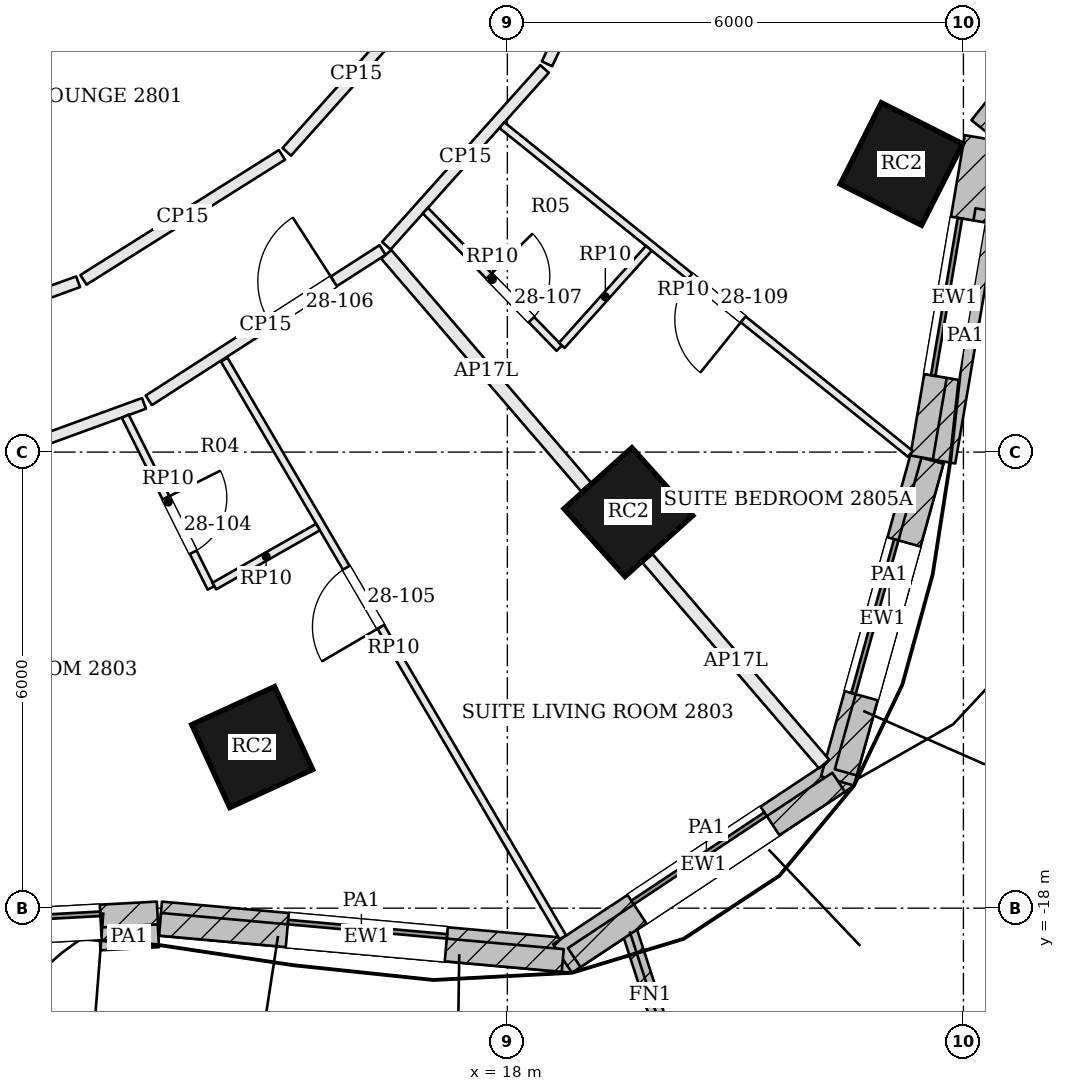
"""IFC4 building model, lengths in metres.
Left out: names, types, materials, properties, quantities, classifications, styles, units other than length and angle.
Written with IfcOpenShell. Run it as: python <this file> out.ifc"""

import sys

from ifc_helpers import new_model, si_unit, direction, frame, frame_2d, origin, origin_2d, place, context, subcontext, project, spatial, rectangle, extrude, element, fill, save


model = new_model("IFC4")
c1 = context("Model", 3, precision=1e-05, world=origin(), true_north=direction((0.0, 1.0)))
c2 = subcontext(c1, "Body", "Model", "MODEL_VIEW")
j1 = project(units=[si_unit("LENGTHUNIT", "METRE"), si_unit("PLANEANGLEUNIT", "RADIAN")], contexts=[c1])
p1 = place(None, origin())
s1 = spatial("IfcSite", under=j1, at=p1, CompositionType="ELEMENT")
p2 = place(p1, origin())
s2 = spatial("IfcBuilding", under=s1, at=p2, CompositionType="ELEMENT")
p3 = place(p2, frame((0.0, 0.0, 117.6)))
s3 = spatial("IfcBuildingStorey", under=s2, at=p3, CompositionType="ELEMENT", Elevation=117.6)
for number, where, z_axis, x_axis in (
    (1, (14.643, -15.881, 0.0), (0.0, 0.0, 1.0), (0.909, 0.417, 0.0)),
    (2, (19.593, -12.79, 0.0), (0.0, 0.0, 1.0), (0.744, 0.668, 0.0)),
    (3, (23.185, -8.21, 0.0), (0.0, 0.0, 1.0), (0.451, 0.893, 0.0)),
):
    element("IfcColumn", number, at=place(p3, frame(where, z_axis=z_axis, x_axis=x_axis)), inside=s3, PredefinedType="COLUMN", context=c2, shape_type="SweptSolid", body=[
        extrude(rectangle(XDim=1.2, YDim=1.2, at=origin_2d()), origin(), (0.0, 0.0, 1.0), 2.8),
    ])
p4 = place(p3, frame((9.803, -18.334, 0.0), z_axis=(0.0, 0.0, 1.0), x_axis=(0.998525941495, 0.054276552602, 0.0)))
e4 = element("IfcWall", 4, at=p4, inside=s3, PredefinedType="SOLIDWALL", context=c2, shape_type="SweptSolid", body=[
    extrude(rectangle(XDim=3.603, YDim=0.45, at=frame_2d((1.802, 0.0))), origin(), (0.0, 0.0, 1.0), 3.3),
])
p5 = place(p4, frame((0.751, 0.0, 0.9)))
e5 = element("IfcOpeningElement", 5, at=p5, cuts=e4, PredefinedType="OPENING", context=c2, shape_type="SweptSolid", body=[
    extrude(rectangle(XDim=2.1, YDim=1.8, at=frame_2d((1.05, 0.9))), frame((0.0, 0.235, 0.0), z_axis=(0.0, -1.0, 0.0), x_axis=(1.0, 0.0, 0.0)), (0.0, 0.0, 1.0), 0.47),
])
p6 = place(p3, frame((13.436, -18.138, 0.0), z_axis=(0.0, 0.0, 1.0), x_axis=(0.99598810213, -0.089485755376, 0.0)))
e6 = element("IfcWall", 6, at=p6, inside=s3, PredefinedType="SOLIDWALL", context=c2, shape_type="SweptSolid", body=[
    extrude(rectangle(XDim=5.451, YDim=0.45, at=frame_2d((2.726, 0.0))), origin(), (0.0, 0.0, 1.0), 3.3),
])
p7 = place(p6, frame((1.676, 0.0, 0.9)))
e7 = element("IfcOpeningElement", 7, at=p7, cuts=e6, PredefinedType="OPENING", context=c2, shape_type="SweptSolid", body=[
    extrude(rectangle(XDim=2.1, YDim=1.8, at=frame_2d((1.05, 0.9))), frame((0.0, 0.235, 0.0), z_axis=(0.0, -1.0, 0.0), x_axis=(1.0, 0.0, 0.0)), (0.0, 0.0, 1.0), 0.47),
])
p8 = place(p3, frame((18.726, -18.663, 0.0), z_axis=(0.0, 0.0, 1.0), x_axis=(0.83333921474, 0.552761931736, 0.0)))
e8 = element("IfcWall", 8, at=p8, inside=s3, PredefinedType="SOLIDWALL", context=c2, shape_type="SweptSolid", body=[
    extrude(rectangle(XDim=4.451, YDim=0.45, at=frame_2d((2.225, 0.0))), origin(), (0.0, 0.0, 1.0), 3.3),
])
p9 = place(p8, frame((1.175, 0.0, 0.9)))
e9 = element("IfcOpeningElement", 9, at=p9, cuts=e8, PredefinedType="OPENING", context=c2, shape_type="SweptSolid", body=[
    extrude(rectangle(XDim=2.1, YDim=1.8, at=frame_2d((1.05, 0.9))), frame((0.0, 0.235, 0.0), z_axis=(0.0, -1.0, 0.0), x_axis=(1.0, 0.0, 0.0)), (0.0, 0.0, 1.0), 0.47),
])
p10 = place(p3, frame((22.344, -16.326, 0.0), z_axis=(0.0, 0.0, 1.0), x_axis=(0.267925456304, 0.963439645159, 0.0)))
e10 = element("IfcWall", 10, at=p10, inside=s3, PredefinedType="SOLIDWALL", context=c2, shape_type="SweptSolid", body=[
    extrude(rectangle(XDim=4.427, YDim=0.45, at=frame_2d((2.213, 0.0))), origin(), (0.0, 0.0, 1.0), 3.3),
])
p11 = place(p10, frame((1.164, 0.0, 0.9)))
e11 = element("IfcOpeningElement", 11, at=p11, cuts=e10, PredefinedType="OPENING", context=c2, shape_type="SweptSolid", body=[
    extrude(rectangle(XDim=2.1, YDim=1.8, at=frame_2d((1.05, 0.9))), frame((0.0, 0.235, 0.0), z_axis=(0.0, -1.0, 0.0), x_axis=(1.0, 0.0, 0.0)), (0.0, 0.0, 1.0), 0.47),
])
p12 = place(p3, frame((23.524, -12.083, 0.0), z_axis=(0.0, 0.0, 1.0), x_axis=(0.167445072349, 0.985881406532, 0.0)))
e12 = element("IfcWall", 12, at=p12, inside=s3, PredefinedType="SOLIDWALL", context=c2, shape_type="SweptSolid", body=[
    extrude(rectangle(XDim=4.275, YDim=0.45, at=frame_2d((2.137, 0.0))), origin(), (0.0, 0.0, 1.0), 3.3),
])
p13 = place(p12, frame((1.087, 0.0, 0.9)))
e13 = element("IfcOpeningElement", 13, at=p13, cuts=e12, PredefinedType="OPENING", context=c2, shape_type="SweptSolid", body=[
    extrude(rectangle(XDim=2.1, YDim=1.8, at=frame_2d((1.05, 0.9))), frame((0.0, 0.235, 0.0), z_axis=(0.0, -1.0, 0.0), x_axis=(1.0, 0.0, 0.0)), (0.0, 0.0, 1.0), 0.47),
])
p14 = place(p3, frame((24.282, -7.774, 0.0), z_axis=(0.0, 0.0, 1.0), x_axis=(0.621735490397, 0.783227285008, 0.0)))
e14 = element("IfcWall", 14, at=p14, inside=s3, PredefinedType="SOLIDWALL", context=c2, shape_type="SweptSolid", body=[
    extrude(rectangle(XDim=4.625, YDim=0.45, at=frame_2d((2.312, 0.0))), origin(), (0.0, 0.0, 1.0), 3.3),
])
p15 = place(p14, frame((1.262, 0.0, 0.9)))
e15 = element("IfcOpeningElement", 15, at=p15, cuts=e14, PredefinedType="OPENING", context=c2, shape_type="SweptSolid", body=[
    extrude(rectangle(XDim=2.1, YDim=1.8, at=frame_2d((1.05, 0.9))), frame((0.0, 0.235, 0.0), z_axis=(0.0, -1.0, 0.0), x_axis=(1.0, 0.0, 0.0)), (0.0, 0.0, 1.0), 0.47),
])
p16 = place(p3, frame((19.609, -18.305, 0.0), z_axis=(0.0, 0.0, 1.0), x_axis=(0.308600224758, -0.951191832008, 0.0)))
e16 = element("IfcWall", 16, at=p16, inside=s3, PredefinedType="SOLIDWALL", context=c2, shape_type="SweptSolid", body=[
    extrude(rectangle(XDim=1.75, YDim=0.2, at=frame_2d((0.875, 0.0))), origin(), (0.0, 0.0, 1.0), 3.3),
])
p17 = place(p3, frame((12.639, -18.405, 3.6), z_axis=(0.0, 0.0, 1.0), x_axis=(0.998517272222, 0.054435806917, 0.0)))
e17 = element("IfcWall", 17, at=p17, inside=s3, PredefinedType="PARAPET", context=c2, shape_type="SweptSolid", body=[
    extrude(rectangle(XDim=0.771, YDim=0.3, at=frame_2d((0.386, 0.0))), origin(), (0.0, 0.0, 1.0), 1.1),
])
p18 = place(p3, frame((13.431, -18.212, 3.6), z_axis=(0.0, 0.0, 1.0), x_axis=(0.995986354678, -0.089505202619, 0.0)))
e18 = element("IfcWall", 18, at=p18, inside=s3, PredefinedType="PARAPET", context=c2, shape_type="SweptSolid", body=[
    extrude(rectangle(XDim=5.319, YDim=0.3, at=frame_2d((2.659, 0.0))), origin(), (0.0, 0.0, 1.0), 1.1),
])
p19 = place(p3, frame((18.88, -18.65, 3.6), z_axis=(0.0, 0.0, 1.0), x_axis=(0.833379877726, 0.552700623667, 0.0)))
e19 = element("IfcWall", 19, at=p19, inside=s3, PredefinedType="PARAPET", context=c2, shape_type="SweptSolid", body=[
    extrude(rectangle(XDim=4.173, YDim=0.3, at=frame_2d((2.087, 0.0))), origin(), (0.0, 0.0, 1.0), 1.1),
])
p20 = place(p3, frame((22.452, -16.213, 3.6), z_axis=(0.0, 0.0, 1.0), x_axis=(0.267993020858, 0.963420853403, 0.0)))
e20 = element("IfcWall", 20, at=p20, inside=s3, PredefinedType="PARAPET", context=c2, shape_type="SweptSolid", body=[
    extrude(rectangle(XDim=4.255, YDim=0.3, at=frame_2d((2.128, 0.0))), origin(), (0.0, 0.0, 1.0), 1.1),
])
p21 = place(p3, frame((23.745, -12.125, 3.6), z_axis=(0.0, 0.0, 1.0), x_axis=(0.167466753484, 0.985877723898, 0.0)))
e21 = element("IfcWall", 21, at=p21, inside=s3, PredefinedType="PARAPET", context=c2, shape_type="SweptSolid", body=[
    extrude(rectangle(XDim=3.354, YDim=0.3, at=frame_2d((1.677, 0.0))), origin(), (0.0, 0.0, 1.0), 1.1),
])
p22 = place(p3, frame((9.728, -12.631, 0.0), z_axis=(0.0, 0.0, 1.0), x_axis=(0.939626438181, 0.342201923826, 0.0)))
e22 = element("IfcWall", 22, at=p22, inside=s3, PredefinedType="PARTITIONING", context=c2, shape_type="SweptSolid", body=[
    extrude(rectangle(XDim=3.716, YDim=0.15, at=frame_2d((1.858, 0.0))), origin(), (0.0, 0.0, 1.0), 2.684),
])
p23 = place(p3, frame((13.283, -11.319, 0.0), z_axis=(0.0, 0.0, 1.0), x_axis=(0.841150270113, 0.540801463653, 0.0)))
e23 = element("IfcWall", 23, at=p23, inside=s3, PredefinedType="PARTITIONING", context=c2, shape_type="SweptSolid", body=[
    extrude(rectangle(XDim=3.656, YDim=0.15, at=frame_2d((1.828, 0.0))), origin(), (0.0, 0.0, 1.0), 2.684),
])
p24 = place(p23, frame((1.894, 0.0, 0.0)))
e24 = element("IfcOpeningElement", 24, at=p24, cuts=e23, PredefinedType="OPENING", context=c2, shape_type="SweptSolid", body=[
    extrude(rectangle(XDim=1.0, YDim=2.1, at=frame_2d((0.5, 1.05))), frame((0.0, 0.085, 0.0), z_axis=(0.0, -1.0, 0.0), x_axis=(1.0, 0.0, 0.0)), (0.0, 0.0, 1.0), 0.17),
])
p25 = place(p3, frame((22.167, -16.104, 0.0), z_axis=(0.0, 0.0, 1.0), x_axis=(-0.651585854712, 0.758574896724, 0.0)))
e25 = element("IfcWall", 25, at=p25, inside=s3, PredefinedType="PARTITIONING", context=c2, shape_type="SweptSolid", body=[
    extrude(rectangle(XDim=3.567, YDim=0.175, at=frame_2d((1.783, 0.0))), origin(), (0.0, 0.0, 1.0), 2.28),
])
p26 = place(p3, frame((19.035, -12.458, 0.0), z_axis=(0.0, 0.0, 1.0), x_axis=(-0.651603524635, 0.7585597186, 0.0)))
e26 = element("IfcWall", 26, at=p26, inside=s3, PredefinedType="PARTITIONING", context=c2, shape_type="SweptSolid", body=[
    extrude(rectangle(XDim=4.033, YDim=0.175, at=frame_2d((2.017, 0.0))), origin(), (0.0, 0.0, 1.0), 2.28),
])
p27 = place(p3, frame((16.408, -9.285, 0.0), z_axis=(0.0, 0.0, 1.0), x_axis=(0.666792573149, 0.745243359174, 0.0)))
e27 = element("IfcWall", 27, at=p27, inside=s3, PredefinedType="PARTITIONING", context=c2, shape_type="SweptSolid", body=[
    extrude(rectangle(XDim=3.121, YDim=0.15, at=frame_2d((1.561, 0.0))), origin(), (0.0, 0.0, 1.0), 2.684),
])
p28 = place(p3, frame((18.522, -6.891, 0.0), z_axis=(0.0, 0.0, 1.0), x_axis=(0.428157819028, 0.903703979191, 0.0)))
e28 = element("IfcWall", 28, at=p28, inside=s3, PredefinedType="PARTITIONING", context=c2, shape_type="SweptSolid", body=[
    extrude(rectangle(XDim=2.349, YDim=0.15, at=frame_2d((1.175, 0.0))), origin(), (0.0, 0.0, 1.0), 2.684),
])
p29 = place(p3, frame((16.925, -6.009, 0.0), z_axis=(0.0, 0.0, 1.0), x_axis=(-0.666893859891, -0.745152722359, 0.0)))
e29 = element("IfcWall", 29, at=p29, inside=s3, PredefinedType="PARTITIONING", context=c2, shape_type="SweptSolid", body=[
    extrude(rectangle(XDim=2.739, YDim=0.15, at=frame_2d((1.37, 0.0))), origin(), (0.0, 0.0, 1.0), 2.684),
])
p30 = place(p3, frame((15.034, -8.09, 0.0), z_axis=(0.0, 0.0, 1.0), x_axis=(-0.846322679414, -0.532670557014, 0.0)))
e30 = element("IfcWall", 30, at=p30, inside=s3, PredefinedType="PARTITIONING", context=c2, shape_type="SweptSolid", body=[
    extrude(rectangle(XDim=3.085, YDim=0.15, at=frame_2d((1.543, 0.0))), origin(), (0.0, 0.0, 1.0), 2.684),
])
p31 = place(p3, frame((12.353, -9.76, 0.0), z_axis=(0.0, 0.0, 1.0), x_axis=(-0.939632450309, -0.342185415127, 0.0)))
e31 = element("IfcWall", 31, at=p31, inside=s3, PredefinedType="PARTITIONING", context=c2, shape_type="SweptSolid", body=[
    extrude(rectangle(XDim=3.368, YDim=0.15, at=frame_2d((1.684, 0.0))), origin(), (0.0, 0.0, 1.0), 2.684),
])
p32 = place(p3, frame((18.73, -18.384, 0.0), z_axis=(0.0, 0.0, 1.0), x_axis=(-0.50573941389, 0.862686295961, 0.0)))
e32 = element("IfcWall", 32, at=p32, inside=s3, PredefinedType="PARTITIONING", context=c2, shape_type="SweptSolid", body=[
    extrude(rectangle(XDim=8.81, YDim=0.1, at=frame_2d((4.405, 0.0))), origin(), (0.0, 0.0, 1.0), 2.684),
])
p33 = place(p32, frame((4.735, 0.0, 0.0)))
e33 = element("IfcOpeningElement", 33, at=p33, cuts=e32, PredefinedType="OPENING", context=c2, shape_type="SweptSolid", body=[
    extrude(rectangle(XDim=0.9, YDim=2.4, at=frame_2d((0.45, 1.2))), frame((0.0, 0.06, 0.0), z_axis=(0.0, -1.0, 0.0), x_axis=(1.0, 0.0, 0.0)), (0.0, 0.0, 1.0), 0.12),
])
p34 = place(p3, frame((12.973, -11.528, 0.0), z_axis=(0.0, 0.0, 1.0), x_axis=(0.446788124497, -0.894639800036, 0.0)))
e34 = element("IfcWall", 34, at=p34, inside=s3, PredefinedType="PARTITIONING", context=c2, shape_type="SweptSolid", body=[
    extrude(rectangle(XDim=2.525, YDim=0.1, at=frame_2d((1.263, 0.0))), origin(), (0.0, 0.0, 1.0), 2.684),
])
p35 = place(p34, frame((1.2, 0.0, 0.0)))
e35 = element("IfcOpeningElement", 35, at=p35, cuts=e34, PredefinedType="OPENING", context=c2, shape_type="SweptSolid", body=[
    extrude(rectangle(XDim=0.8, YDim=2.1, at=frame_2d((0.4, 1.05))), frame((0.0, 0.06, 0.0), z_axis=(0.0, -1.0, 0.0), x_axis=(1.0, 0.0, 0.0)), (0.0, 0.0, 1.0), 0.12),
])
p36 = place(p3, frame((14.145, -13.763, 0.0), z_axis=(0.0, 0.0, 1.0), x_axis=(0.869036936982, 0.494747210363, 0.0)))
e36 = element("IfcWall", 36, at=p36, inside=s3, PredefinedType="PARTITIONING", context=c2, shape_type="SweptSolid", body=[
    extrude(rectangle(XDim=1.569, YDim=0.1, at=frame_2d((0.784, 0.0))), origin(), (0.0, 0.0, 1.0), 2.684),
])
p37 = place(p3, frame((23.302, -12.023, 0.0), z_axis=(0.0, 0.0, 1.0), x_axis=(-0.779049211338, 0.626962779049, 0.0)))
e37 = element("IfcWall", 37, at=p37, inside=s3, PredefinedType="PARTITIONING", context=c2, shape_type="SweptSolid", body=[
    extrude(rectangle(XDim=6.898, YDim=0.1, at=frame_2d((3.449, 0.0))), origin(), (0.0, 0.0, 1.0), 2.684),
])
p38 = place(p37, frame((2.823, 0.0, 0.0)))
e38 = element("IfcOpeningElement", 38, at=p38, cuts=e37, PredefinedType="OPENING", context=c2, shape_type="SweptSolid", body=[
    extrude(rectangle(XDim=0.9, YDim=2.4, at=frame_2d((0.45, 1.2))), frame((0.0, 0.06, 0.0), z_axis=(0.0, -1.0, 0.0), x_axis=(1.0, 0.0, 0.0)), (0.0, 0.0, 1.0), 0.12),
])
p39 = place(p3, frame((16.922, -8.823, 0.0), z_axis=(0.0, 0.0, 1.0), x_axis=(0.697371069569, -0.71671025619, 0.0)))
e39 = element("IfcWall", 39, at=p39, inside=s3, PredefinedType="PARTITIONING", context=c2, shape_type="SweptSolid", body=[
    extrude(rectangle(XDim=2.525, YDim=0.1, at=frame_2d((1.262, 0.0))), origin(), (0.0, 0.0, 1.0), 2.684),
])
p40 = place(p39, frame((1.2, 0.0, 0.0)))
e40 = element("IfcOpeningElement", 40, at=p40, cuts=e39, PredefinedType="OPENING", context=c2, shape_type="SweptSolid", body=[
    extrude(rectangle(XDim=0.8, YDim=2.1, at=frame_2d((0.4, 1.05))), frame((0.0, 0.06, 0.0), z_axis=(0.0, -1.0, 0.0), x_axis=(1.0, 0.0, 0.0)), (0.0, 0.0, 1.0), 0.12),
])
p41 = place(p3, frame((18.716, -10.596, 0.0), z_axis=(0.0, 0.0, 1.0), x_axis=(0.667863253754, 0.744284001094, 0.0)))
e41 = element("IfcWall", 41, at=p41, inside=s3, PredefinedType="PARTITIONING", context=c2, shape_type="SweptSolid", body=[
    extrude(rectangle(XDim=1.716, YDim=0.1, at=frame_2d((0.858, 0.0))), origin(), (0.0, 0.0, 1.0), 2.684),
])
p42 = place(p5, origin())
e42 = element("IfcWindow", 42, at=p42, inside=s3, PartitioningType="SINGLE_PANEL", PredefinedType="WINDOW", context=c2, shape_type="SweptSolid", body=[
    extrude(rectangle(XDim=2.1, YDim=1.8, at=frame_2d((1.05, 0.9))), frame((0.0, 0.135, 0.0), z_axis=(0.0, -1.0, 0.0), x_axis=(1.0, 0.0, 0.0)), (0.0, 0.0, 1.0), 0.06),
])
fill(e5, e42)
p43 = place(p7, origin())
e43 = element("IfcWindow", 43, at=p43, inside=s3, PartitioningType="SINGLE_PANEL", PredefinedType="WINDOW", context=c2, shape_type="SweptSolid", body=[
    extrude(rectangle(XDim=2.1, YDim=1.8, at=frame_2d((1.05, 0.9))), frame((0.0, 0.135, 0.0), z_axis=(0.0, -1.0, 0.0), x_axis=(1.0, 0.0, 0.0)), (0.0, 0.0, 1.0), 0.06),
])
fill(e7, e43)
p44 = place(p9, origin())
e44 = element("IfcWindow", 44, at=p44, inside=s3, PartitioningType="SINGLE_PANEL", PredefinedType="WINDOW", context=c2, shape_type="SweptSolid", body=[
    extrude(rectangle(XDim=2.1, YDim=1.8, at=frame_2d((1.05, 0.9))), frame((0.0, 0.135, 0.0), z_axis=(0.0, -1.0, 0.0), x_axis=(1.0, 0.0, 0.0)), (0.0, 0.0, 1.0), 0.06),
])
fill(e9, e44)
p45 = place(p11, origin())
e45 = element("IfcWindow", 45, at=p45, inside=s3, PartitioningType="SINGLE_PANEL", PredefinedType="WINDOW", context=c2, shape_type="SweptSolid", body=[
    extrude(rectangle(XDim=2.1, YDim=1.8, at=frame_2d((1.05, 0.9))), frame((0.0, 0.135, 0.0), z_axis=(0.0, -1.0, 0.0), x_axis=(1.0, 0.0, 0.0)), (0.0, 0.0, 1.0), 0.06),
])
fill(e11, e45)
p46 = place(p13, origin())
e46 = element("IfcWindow", 46, at=p46, inside=s3, PartitioningType="SINGLE_PANEL", PredefinedType="WINDOW", context=c2, shape_type="SweptSolid", body=[
    extrude(rectangle(XDim=2.1, YDim=1.8, at=frame_2d((1.05, 0.9))), frame((0.0, 0.135, 0.0), z_axis=(0.0, -1.0, 0.0), x_axis=(1.0, 0.0, 0.0)), (0.0, 0.0, 1.0), 0.06),
])
fill(e13, e46)
p47 = place(p35, origin())
e47 = element("IfcDoor", 47, at=p47, inside=s3, OperationType="SINGLE_SWING_LEFT", PredefinedType="DOOR", context=c2, shape_type="SweptSolid", body=[
    extrude(rectangle(XDim=0.8, YDim=2.1, at=frame_2d((0.4, 1.05))), frame((0.0, 0.025, 0.0), z_axis=(0.0, -1.0, 0.0), x_axis=(1.0, 0.0, 0.0)), (0.0, 0.0, 1.0), 0.05),
])
fill(e35, e47)
p48 = place(p33, origin())
e48 = element("IfcDoor", 48, at=p48, inside=s3, OperationType="SINGLE_SWING_LEFT", PredefinedType="DOOR", context=c2, shape_type="SweptSolid", body=[
    extrude(rectangle(XDim=0.9, YDim=2.4, at=frame_2d((0.45, 1.2))), frame((0.0, 0.025, 0.0), z_axis=(0.0, -1.0, 0.0), x_axis=(1.0, 0.0, 0.0)), (0.0, 0.0, 1.0), 0.05),
])
fill(e33, e48)
p49 = place(p24, origin())
e49 = element("IfcDoor", 49, at=p49, inside=s3, OperationType="SINGLE_SWING_RIGHT", PredefinedType="DOOR", context=c2, shape_type="SweptSolid", body=[
    extrude(rectangle(XDim=1.0, YDim=2.1, at=frame_2d((0.5, 1.05))), frame((0.0, 0.025, 0.0), z_axis=(0.0, -1.0, 0.0), x_axis=(1.0, 0.0, 0.0)), (0.0, 0.0, 1.0), 0.05),
])
fill(e24, e49)
p50 = place(p40, origin())
e50 = element("IfcDoor", 50, at=p50, inside=s3, OperationType="SINGLE_SWING_LEFT", PredefinedType="DOOR", context=c2, shape_type="SweptSolid", body=[
    extrude(rectangle(XDim=0.8, YDim=2.1, at=frame_2d((0.4, 1.05))), frame((0.0, 0.025, 0.0), z_axis=(0.0, -1.0, 0.0), x_axis=(1.0, 0.0, 0.0)), (0.0, 0.0, 1.0), 0.05),
])
fill(e40, e50)
p51 = place(p38, origin())
e51 = element("IfcDoor", 51, at=p51, inside=s3, OperationType="SINGLE_SWING_LEFT", PredefinedType="DOOR", context=c2, shape_type="SweptSolid", body=[
    extrude(rectangle(XDim=0.9, YDim=2.4, at=frame_2d((0.45, 1.2))), frame((0.0, 0.025, 0.0), z_axis=(0.0, -1.0, 0.0), x_axis=(1.0, 0.0, 0.0)), (0.0, 0.0, 1.0), 0.05),
])
fill(e38, e51)
save(model, sys.argv[1])
